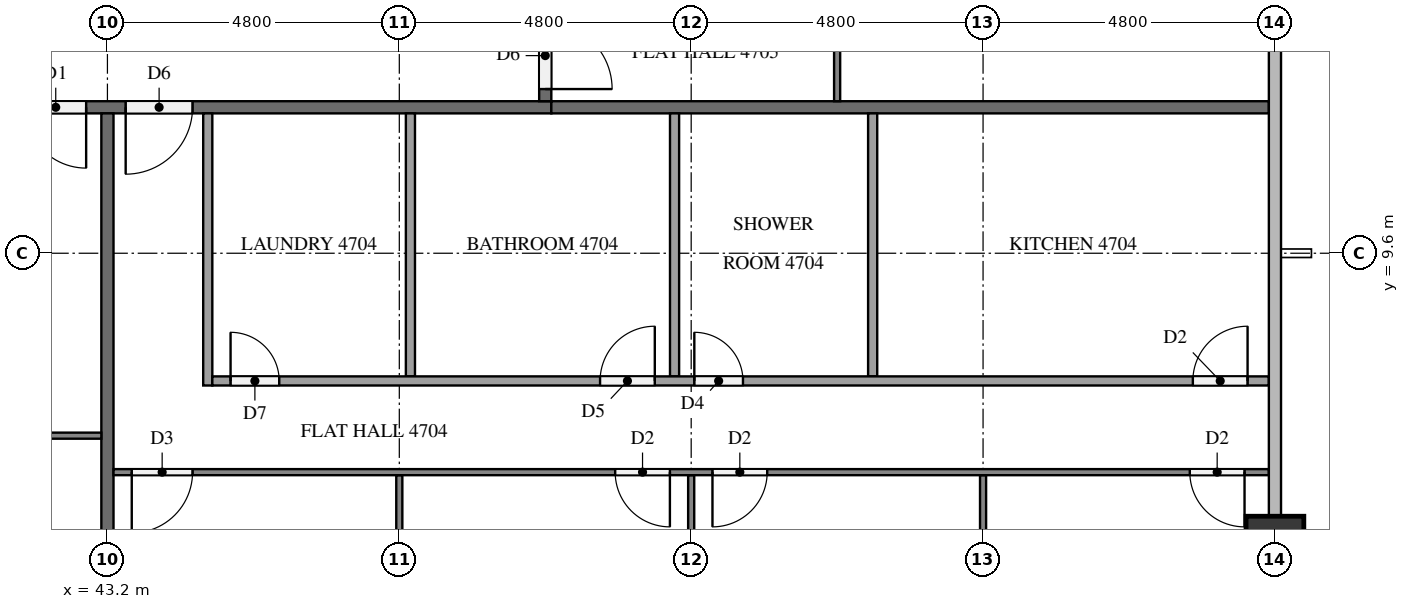
"""IFC4 building model, lengths in metres.
Left out: names, types, materials, properties, quantities, classifications, styles, units other than length and angle.
Written with IfcOpenShell. Run it as: python <this file> out.ifc"""

import sys

from ifc_helpers import new_model, si_unit, direction, frame, frame_2d, origin, origin_2d, place, context, subcontext, project, spatial, rectangle, extrude, element, fill, save


model = new_model("IFC4")
c1 = context("Model", 3, precision=1e-05, world=origin(), true_north=direction((0.0, 1.0)))
c2 = subcontext(c1, "Body", "Model", "MODEL_VIEW")
j1 = project(units=[si_unit("LENGTHUNIT", "METRE"), si_unit("PLANEANGLEUNIT", "RADIAN")], contexts=[c1])
p1 = place(None, origin())
s1 = spatial("IfcSite", under=j1, at=p1, CompositionType="ELEMENT")
p2 = place(p1, origin())
s2 = spatial("IfcBuilding", under=s1, at=p2, CompositionType="ELEMENT")
p3 = place(p2, frame((0.0, 0.0, 182.4)))
s3 = spatial("IfcBuildingStorey", under=s2, at=p3, CompositionType="ELEMENT", Elevation=182.4)
p4 = place(p3, frame((62.4, 4.8, 0.0), z_axis=(0.0, 0.0, 1.0), x_axis=(1.0, 0.0, 0.0)))
e1 = element("IfcColumn", 1, at=p4, inside=s3, PredefinedType="COLUMN", context=c2, shape_type="SweptSolid", body=[
    extrude(rectangle(XDim=0.95, YDim=0.95, at=origin_2d()), origin(), (0.0, 0.0, 1.0), 3.2),
])
p5 = place(p3, frame((50.5, 12.0, 0.0), z_axis=(0.0, 0.0, 1.0), x_axis=(-1.0, 0.0, 0.0)))
e2 = element("IfcWall", 2, at=p5, inside=s3, PredefinedType="PARTITIONING", context=c2, shape_type="SweptSolid", body=[
    extrude(rectangle(XDim=38.6, YDim=0.2, at=frame_2d((19.3, 0.0))), origin(), (0.0, 0.0, 1.0), 3.2),
])
p6 = place(p5, frame((31.65, 0.0, 0.0)))
e3 = element("IfcOpeningElement", 3, at=p6, cuts=e2, PredefinedType="OPENING", context=c2, shape_type="SweptSolid", body=[
    extrude(rectangle(XDim=1.0, YDim=2.1, at=frame_2d((0.5, 1.05))), frame((0.0, 0.11, 0.0), z_axis=(0.0, -1.0, 0.0), x_axis=(1.0, 0.0, 0.0)), (0.0, 0.0, 1.0), 0.22),
])
p7 = place(p5, frame((17.25, 0.0, 0.0)))
e4 = element("IfcOpeningElement", 4, at=p7, cuts=e2, PredefinedType="OPENING", context=c2, shape_type="SweptSolid", body=[
    extrude(rectangle(XDim=1.0, YDim=2.1, at=frame_2d((0.5, 1.05))), frame((0.0, 0.11, 0.0), z_axis=(0.0, -1.0, 0.0), x_axis=(1.0, 0.0, 0.0)), (0.0, 0.0, 1.0), 0.22),
])
p8 = place(p5, frame((7.65, 0.0, 0.0)))
e5 = element("IfcOpeningElement", 5, at=p8, cuts=e2, PredefinedType="OPENING", context=c2, shape_type="SweptSolid", body=[
    extrude(rectangle(XDim=1.0, YDim=2.1, at=frame_2d((0.5, 1.05))), frame((0.0, 0.11, 0.0), z_axis=(0.0, -1.0, 0.0), x_axis=(1.0, 0.0, 0.0)), (0.0, 0.0, 1.0), 0.22),
])
p9 = place(p5, frame((5.9, 0.0, 0.0)))
e6 = element("IfcOpeningElement", 6, at=p9, cuts=e2, PredefinedType="OPENING", context=c2, shape_type="SweptSolid", body=[
    extrude(rectangle(XDim=1.1, YDim=2.1, at=frame_2d((0.55, 1.05))), frame((0.0, 0.11, 0.0), z_axis=(0.0, -1.0, 0.0), x_axis=(1.0, 0.0, 0.0)), (0.0, 0.0, 1.0), 0.22),
])
p10 = place(p3, frame((50.4, 40.7, 0.0), z_axis=(0.0, 0.0, 1.0), x_axis=(0.0, -1.0, 0.0)))
e7 = element("IfcWall", 7, at=p10, inside=s3, PredefinedType="PARTITIONING", context=c2, shape_type="SweptSolid", body=[
    extrude(rectangle(XDim=28.6, YDim=0.2, at=frame_2d((14.3, 0.0))), origin(), (0.0, 0.0, 1.0), 3.2),
])
p11 = place(p10, frame((27.3, 0.0, 0.0)))
e8 = element("IfcOpeningElement", 8, at=p11, cuts=e7, PredefinedType="OPENING", context=c2, shape_type="SweptSolid", body=[
    extrude(rectangle(XDim=1.1, YDim=2.1, at=frame_2d((0.55, 1.05))), frame((0.0, 0.11, 0.0), z_axis=(0.0, -1.0, 0.0), x_axis=(1.0, 0.0, 0.0)), (0.0, 0.0, 1.0), 0.22),
])
p12 = place(p10, frame((8.15, 0.0, 0.0)))
e9 = element("IfcOpeningElement", 9, at=p12, cuts=e7, PredefinedType="OPENING", context=c2, shape_type="SweptSolid", body=[
    extrude(rectangle(XDim=1.0, YDim=2.1, at=frame_2d((0.5, 1.05))), frame((0.0, 0.11, 0.0), z_axis=(0.0, -1.0, 0.0), x_axis=(1.0, 0.0, 0.0)), (0.0, 0.0, 1.0), 0.22),
])
p13 = place(p10, frame((0.95, 0.0, 0.0)))
e10 = element("IfcOpeningElement", 10, at=p13, cuts=e7, PredefinedType="OPENING", context=c2, shape_type="SweptSolid", body=[
    extrude(rectangle(XDim=1.0, YDim=2.1, at=frame_2d((0.5, 1.05))), frame((0.0, 0.11, 0.0), z_axis=(0.0, -1.0, 0.0), x_axis=(1.0, 0.0, 0.0)), (0.0, 0.0, 1.0), 0.22),
])
p14 = place(p3, frame((43.2, 11.9, 0.0), z_axis=(0.0, 0.0, 1.0), x_axis=(0.0, -1.0, 0.0)))
e11 = element("IfcWall", 11, at=p14, inside=s3, PredefinedType="PARTITIONING", context=c2, shape_type="SweptSolid", body=[
    extrude(rectangle(XDim=11.8, YDim=0.2, at=frame_2d((5.9, 0.0))), origin(), (0.0, 0.0, 1.0), 3.2),
])
p15 = place(p3, frame((50.5, 12.0, 0.0), z_axis=(0.0, 0.0, 1.0), x_axis=(1.0, 0.0, 0.0)))
e12 = element("IfcWall", 12, at=p15, inside=s3, PredefinedType="PARTITIONING", context=c2, shape_type="SweptSolid", body=[
    extrude(rectangle(XDim=11.8, YDim=0.2, at=frame_2d((5.9, 0.0))), origin(), (0.0, 0.0, 1.0), 3.2),
])
p16 = place(p3, frame((43.1, 6.6, 0.0), z_axis=(0.0, 0.0, 1.0), x_axis=(-1.0, 0.0, 0.0)))
e13 = element("IfcWall", 13, at=p16, inside=s3, PredefinedType="PARTITIONING", context=c2, shape_type="SweptSolid", body=[
    extrude(rectangle(XDim=9.4, YDim=0.1, at=frame_2d((4.7, 0.0))), origin(), (0.0, 0.0, 1.0), 3.2),
])
p17 = place(p16, frame((3.35, 0.0, 0.0)))
e14 = element("IfcOpeningElement", 14, at=p17, cuts=e13, PredefinedType="OPENING", context=c2, shape_type="SweptSolid", body=[
    extrude(rectangle(XDim=1.0, YDim=2.1, at=frame_2d((0.5, 1.05))), frame((0.0, 0.06, 0.0), z_axis=(0.0, -1.0, 0.0), x_axis=(1.0, 0.0, 0.0)), (0.0, 0.0, 1.0), 0.12),
])
p18 = place(p16, frame((5.05, 0.0, 0.0)))
e15 = element("IfcOpeningElement", 15, at=p18, cuts=e13, PredefinedType="OPENING", context=c2, shape_type="SweptSolid", body=[
    extrude(rectangle(XDim=0.9, YDim=2.1, at=frame_2d((0.45, 1.05))), frame((0.0, 0.06, 0.0), z_axis=(0.0, -1.0, 0.0), x_axis=(1.0, 0.0, 0.0)), (0.0, 0.0, 1.0), 0.12),
])
p19 = place(p3, frame((48.0, 5.95, 0.0), z_axis=(0.0, 0.0, 1.0), x_axis=(0.0, -1.0, 0.0)))
e16 = element("IfcWall", 16, at=p19, inside=s3, PredefinedType="PARTITIONING", context=c2, shape_type="SweptSolid", body=[
    extrude(rectangle(XDim=5.625, YDim=0.1, at=frame_2d((2.812, 0.0))), origin(), (0.0, 0.0, 1.0), 3.2),
])
p20 = place(p3, frame((52.8, 5.95, 0.0), z_axis=(0.0, 0.0, 1.0), x_axis=(0.0, -1.0, 0.0)))
e17 = element("IfcWall", 17, at=p20, inside=s3, PredefinedType="PARTITIONING", context=c2, shape_type="SweptSolid", body=[
    extrude(rectangle(XDim=5.85, YDim=0.1, at=frame_2d((2.925, 0.0))), origin(), (0.0, 0.0, 1.0), 3.2),
])
p21 = place(p3, frame((57.6, 5.95, 0.0), z_axis=(0.0, 0.0, 1.0), x_axis=(0.0, -1.0, 0.0)))
e18 = element("IfcWall", 18, at=p21, inside=s3, PredefinedType="PARTITIONING", context=c2, shape_type="SweptSolid", body=[
    extrude(rectangle(XDim=5.475, YDim=0.1, at=frame_2d((2.737, 0.0))), origin(), (0.0, 0.0, 1.0), 3.2),
])
p22 = place(p3, frame((62.3, 6.0, 0.0), z_axis=(0.0, 0.0, 1.0), x_axis=(-1.0, 0.0, 0.0)))
e19 = element("IfcWall", 19, at=p22, inside=s3, PredefinedType="PARTITIONING", context=c2, shape_type="SweptSolid", body=[
    extrude(rectangle(XDim=19.0, YDim=0.1, at=frame_2d((9.5, 0.0))), origin(), (0.0, 0.0, 1.0), 3.2),
])
p23 = place(p22, frame((17.7, 0.0, 0.0)))
e20 = element("IfcOpeningElement", 20, at=p23, cuts=e19, PredefinedType="OPENING", context=c2, shape_type="SweptSolid", body=[
    extrude(rectangle(XDim=1.0, YDim=2.1, at=frame_2d((0.5, 1.05))), frame((0.0, 0.06, 0.0), z_axis=(0.0, -1.0, 0.0), x_axis=(1.0, 0.0, 0.0)), (0.0, 0.0, 1.0), 0.12),
])
p24 = place(p22, frame((9.85, 0.0, 0.0)))
e21 = element("IfcOpeningElement", 21, at=p24, cuts=e19, PredefinedType="OPENING", context=c2, shape_type="SweptSolid", body=[
    extrude(rectangle(XDim=0.9, YDim=2.1, at=frame_2d((0.45, 1.05))), frame((0.0, 0.06, 0.0), z_axis=(0.0, -1.0, 0.0), x_axis=(1.0, 0.0, 0.0)), (0.0, 0.0, 1.0), 0.12),
])
p25 = place(p22, frame((8.25, 0.0, 0.0)))
e22 = element("IfcOpeningElement", 22, at=p25, cuts=e19, PredefinedType="OPENING", context=c2, shape_type="SweptSolid", body=[
    extrude(rectangle(XDim=0.9, YDim=2.1, at=frame_2d((0.45, 1.05))), frame((0.0, 0.06, 0.0), z_axis=(0.0, -1.0, 0.0), x_axis=(1.0, 0.0, 0.0)), (0.0, 0.0, 1.0), 0.12),
])
p26 = place(p22, frame((0.4, 0.0, 0.0)))
e23 = element("IfcOpeningElement", 23, at=p26, cuts=e19, PredefinedType="OPENING", context=c2, shape_type="SweptSolid", body=[
    extrude(rectangle(XDim=0.9, YDim=2.1, at=frame_2d((0.45, 1.05))), frame((0.0, 0.06, 0.0), z_axis=(0.0, -1.0, 0.0), x_axis=(1.0, 0.0, 0.0)), (0.0, 0.0, 1.0), 0.12),
])
for number, where, z_axis, x_axis in (
    (24, (48.183, 11.9, 0.0), (0.0, 0.0, 1.0), (0.0, -1.0, 0.0)),
    (25, (52.527, 11.9, 0.0), (0.0, 0.0, 1.0), (0.0, -1.0, 0.0)),
    (26, (55.784, 11.9, 0.0), (0.0, 0.0, 1.0), (0.0, -1.0, 0.0)),
):
    element("IfcWall", number, at=place(p3, frame(where, z_axis=z_axis, x_axis=x_axis)), inside=s3, PredefinedType="PARTITIONING", context=c2, shape_type="SweptSolid", body=[
        extrude(rectangle(XDim=4.325, YDim=0.15, at=frame_2d((2.163, 0.0))), origin(), (0.0, 0.0, 1.0), 3.2),
    ])
p27 = place(p3, frame((44.85, 11.9, 0.0), z_axis=(0.0, 0.0, 1.0), x_axis=(0.0, -1.0, 0.0)))
e27 = element("IfcWall", 27, at=p27, inside=s3, PredefinedType="PARTITIONING", context=c2, shape_type="SweptSolid", body=[
    extrude(rectangle(XDim=4.475, YDim=0.15, at=frame_2d((2.237, 0.0))), origin(), (0.0, 0.0, 1.0), 3.2),
])
p28 = place(p3, frame((44.925, 7.5, 0.0), z_axis=(0.0, 0.0, 1.0), x_axis=(1.0, 0.0, 0.0)))
e28 = element("IfcWall", 28, at=p28, inside=s3, PredefinedType="PARTITIONING", context=c2, shape_type="SweptSolid", body=[
    extrude(rectangle(XDim=17.375, YDim=0.15, at=frame_2d((8.688, 0.0))), origin(), (0.0, 0.0, 1.0), 3.2),
])
p29 = place(p28, frame((0.3, 0.0, 0.0)))
e29 = element("IfcOpeningElement", 29, at=p29, cuts=e28, PredefinedType="OPENING", context=c2, shape_type="SweptSolid", body=[
    extrude(rectangle(XDim=0.8, YDim=2.1, at=frame_2d((0.4, 1.05))), frame((0.0, 0.085, 0.0), z_axis=(0.0, -1.0, 0.0), x_axis=(1.0, 0.0, 0.0)), (0.0, 0.0, 1.0), 0.17),
])
p30 = place(p28, frame((6.377, 0.0, 0.0)))
e30 = element("IfcOpeningElement", 30, at=p30, cuts=e28, PredefinedType="OPENING", context=c2, shape_type="SweptSolid", body=[
    extrude(rectangle(XDim=0.9, YDim=2.1, at=frame_2d((0.45, 1.05))), frame((0.0, 0.085, 0.0), z_axis=(0.0, -1.0, 0.0), x_axis=(1.0, 0.0, 0.0)), (0.0, 0.0, 1.0), 0.17),
])
p31 = place(p28, frame((7.927, 0.0, 0.0)))
e31 = element("IfcOpeningElement", 31, at=p31, cuts=e28, PredefinedType="OPENING", context=c2, shape_type="SweptSolid", body=[
    extrude(rectangle(XDim=0.8, YDim=2.1, at=frame_2d((0.4, 1.05))), frame((0.0, 0.085, 0.0), z_axis=(0.0, -1.0, 0.0), x_axis=(1.0, 0.0, 0.0)), (0.0, 0.0, 1.0), 0.17),
])
p32 = place(p28, frame((16.125, 0.0, 0.0)))
e32 = element("IfcOpeningElement", 32, at=p32, cuts=e28, PredefinedType="OPENING", context=c2, shape_type="SweptSolid", body=[
    extrude(rectangle(XDim=0.9, YDim=2.1, at=frame_2d((0.45, 1.05))), frame((0.0, 0.085, 0.0), z_axis=(0.0, -1.0, 0.0), x_axis=(1.0, 0.0, 0.0)), (0.0, 0.0, 1.0), 0.17),
])
p33 = place(p3, frame((55.2, 31.1, 0.0), z_axis=(0.0, 0.0, 1.0), x_axis=(0.0, -1.0, 0.0)))
e33 = element("IfcWall", 33, at=p33, inside=s3, PredefinedType="PARTITIONING", context=c2, shape_type="SweptSolid", body=[
    extrude(rectangle(XDim=19.0, YDim=0.1, at=frame_2d((9.5, 0.0))), origin(), (0.0, 0.0, 1.0), 3.2),
])
p34 = place(p33, frame((14.65, 0.0, 0.0)))
e34 = element("IfcOpeningElement", 34, at=p34, cuts=e33, PredefinedType="OPENING", context=c2, shape_type="SweptSolid", body=[
    extrude(rectangle(XDim=0.9, YDim=2.1, at=frame_2d((0.45, 1.05))), frame((0.0, 0.06, 0.0), z_axis=(0.0, -1.0, 0.0), x_axis=(1.0, 0.0, 0.0)), (0.0, 0.0, 1.0), 0.12),
])
p35 = place(p33, frame((12.95, 0.0, 0.0)))
e35 = element("IfcOpeningElement", 35, at=p35, cuts=e33, PredefinedType="OPENING", context=c2, shape_type="SweptSolid", body=[
    extrude(rectangle(XDim=1.0, YDim=2.1, at=frame_2d((0.5, 1.05))), frame((0.0, 0.06, 0.0), z_axis=(0.0, -1.0, 0.0), x_axis=(1.0, 0.0, 0.0)), (0.0, 0.0, 1.0), 0.12),
])
p36 = place(p33, frame((5.05, 0.0, 0.0)))
e36 = element("IfcOpeningElement", 36, at=p36, cuts=e33, PredefinedType="OPENING", context=c2, shape_type="SweptSolid", body=[
    extrude(rectangle(XDim=0.9, YDim=2.1, at=frame_2d((0.45, 1.05))), frame((0.0, 0.06, 0.0), z_axis=(0.0, -1.0, 0.0), x_axis=(1.0, 0.0, 0.0)), (0.0, 0.0, 1.0), 0.12),
])
p37 = place(p33, frame((3.45, 0.0, 0.0)))
e37 = element("IfcOpeningElement", 37, at=p37, cuts=e33, PredefinedType="OPENING", context=c2, shape_type="SweptSolid", body=[
    extrude(rectangle(XDim=0.9, YDim=2.1, at=frame_2d((0.45, 1.05))), frame((0.0, 0.06, 0.0), z_axis=(0.0, -1.0, 0.0), x_axis=(1.0, 0.0, 0.0)), (0.0, 0.0, 1.0), 0.12),
])
p38 = place(p8, origin())
e38 = element("IfcDoor", 38, at=p38, inside=s3, OperationType="SINGLE_SWING_LEFT", PredefinedType="DOOR", context=c2, shape_type="SweptSolid", body=[
    extrude(rectangle(XDim=1.0, YDim=2.1, at=frame_2d((0.5, 1.05))), frame((0.0, 0.025, 0.0), z_axis=(0.0, -1.0, 0.0), x_axis=(1.0, 0.0, 0.0)), (0.0, 0.0, 1.0), 0.05),
])
fill(e5, e38)
p39 = place(p9, origin())
e39 = element("IfcDoor", 39, at=p39, inside=s3, OperationType="SINGLE_SWING_RIGHT", PredefinedType="DOOR", context=c2, shape_type="SweptSolid", body=[
    extrude(rectangle(XDim=1.1, YDim=2.1, at=frame_2d((0.55, 1.05))), frame((0.0, 0.025, 0.0), z_axis=(0.0, -1.0, 0.0), x_axis=(1.0, 0.0, 0.0)), (0.0, 0.0, 1.0), 0.05),
])
fill(e6, e39)
p40 = place(p11, origin())
e40 = element("IfcDoor", 40, at=p40, inside=s3, OperationType="SINGLE_SWING_RIGHT", PredefinedType="DOOR", context=c2, shape_type="SweptSolid", body=[
    extrude(rectangle(XDim=1.1, YDim=2.1, at=frame_2d((0.55, 1.05))), frame((0.0, 0.025, 0.0), z_axis=(0.0, -1.0, 0.0), x_axis=(1.0, 0.0, 0.0)), (0.0, 0.0, 1.0), 0.05),
])
fill(e8, e40)
p41 = place(p23, origin())
e41 = element("IfcDoor", 41, at=p41, inside=s3, OperationType="SINGLE_SWING_RIGHT", PredefinedType="DOOR", context=c2, shape_type="SweptSolid", body=[
    extrude(rectangle(XDim=1.0, YDim=2.1, at=frame_2d((0.5, 1.05))), frame((0.0, 0.025, 0.0), z_axis=(0.0, -1.0, 0.0), x_axis=(1.0, 0.0, 0.0)), (0.0, 0.0, 1.0), 0.05),
])
fill(e20, e41)
p42 = place(p24, origin())
e42 = element("IfcDoor", 42, at=p42, inside=s3, OperationType="SINGLE_SWING_LEFT", PredefinedType="DOOR", context=c2, shape_type="SweptSolid", body=[
    extrude(rectangle(XDim=0.9, YDim=2.1, at=frame_2d((0.45, 1.05))), frame((0.0, 0.025, 0.0), z_axis=(0.0, -1.0, 0.0), x_axis=(1.0, 0.0, 0.0)), (0.0, 0.0, 1.0), 0.05),
])
fill(e21, e42)
p43 = place(p25, origin())
e43 = element("IfcDoor", 43, at=p43, inside=s3, OperationType="SINGLE_SWING_RIGHT", PredefinedType="DOOR", context=c2, shape_type="SweptSolid", body=[
    extrude(rectangle(XDim=0.9, YDim=2.1, at=frame_2d((0.45, 1.05))), frame((0.0, 0.025, 0.0), z_axis=(0.0, -1.0, 0.0), x_axis=(1.0, 0.0, 0.0)), (0.0, 0.0, 1.0), 0.05),
])
fill(e22, e43)
p44 = place(p26, origin())
e44 = element("IfcDoor", 44, at=p44, inside=s3, OperationType="SINGLE_SWING_LEFT", PredefinedType="DOOR", context=c2, shape_type="SweptSolid", body=[
    extrude(rectangle(XDim=0.9, YDim=2.1, at=frame_2d((0.45, 1.05))), frame((0.0, 0.025, 0.0), z_axis=(0.0, -1.0, 0.0), x_axis=(1.0, 0.0, 0.0)), (0.0, 0.0, 1.0), 0.05),
])
fill(e23, e44)
p45 = place(p29, origin())
e45 = element("IfcDoor", 45, at=p45, inside=s3, OperationType="SINGLE_SWING_LEFT", PredefinedType="DOOR", context=c2, shape_type="SweptSolid", body=[
    extrude(rectangle(XDim=0.8, YDim=2.1, at=frame_2d((0.4, 1.05))), frame((0.0, 0.025, 0.0), z_axis=(0.0, -1.0, 0.0), x_axis=(1.0, 0.0, 0.0)), (0.0, 0.0, 1.0), 0.05),
])
fill(e29, e45)
p46 = place(p30, origin())
e46 = element("IfcDoor", 46, at=p46, inside=s3, OperationType="SINGLE_SWING_RIGHT", PredefinedType="DOOR", context=c2, shape_type="SweptSolid", body=[
    extrude(rectangle(XDim=0.9, YDim=2.1, at=frame_2d((0.45, 1.05))), frame((0.0, 0.025, 0.0), z_axis=(0.0, -1.0, 0.0), x_axis=(1.0, 0.0, 0.0)), (0.0, 0.0, 1.0), 0.05),
])
fill(e30, e46)
p47 = place(p31, origin())
e47 = element("IfcDoor", 47, at=p47, inside=s3, OperationType="SINGLE_SWING_LEFT", PredefinedType="DOOR", context=c2, shape_type="SweptSolid", body=[
    extrude(rectangle(XDim=0.8, YDim=2.1, at=frame_2d((0.4, 1.05))), frame((0.0, 0.025, 0.0), z_axis=(0.0, -1.0, 0.0), x_axis=(1.0, 0.0, 0.0)), (0.0, 0.0, 1.0), 0.05),
])
fill(e31, e47)
p48 = place(p32, origin())
e48 = element("IfcDoor", 48, at=p48, inside=s3, OperationType="SINGLE_SWING_RIGHT", PredefinedType="DOOR", context=c2, shape_type="SweptSolid", body=[
    extrude(rectangle(XDim=0.9, YDim=2.1, at=frame_2d((0.45, 1.05))), frame((0.0, 0.025, 0.0), z_axis=(0.0, -1.0, 0.0), x_axis=(1.0, 0.0, 0.0)), (0.0, 0.0, 1.0), 0.05),
])
fill(e32, e48)
save(model, sys.argv[1])
